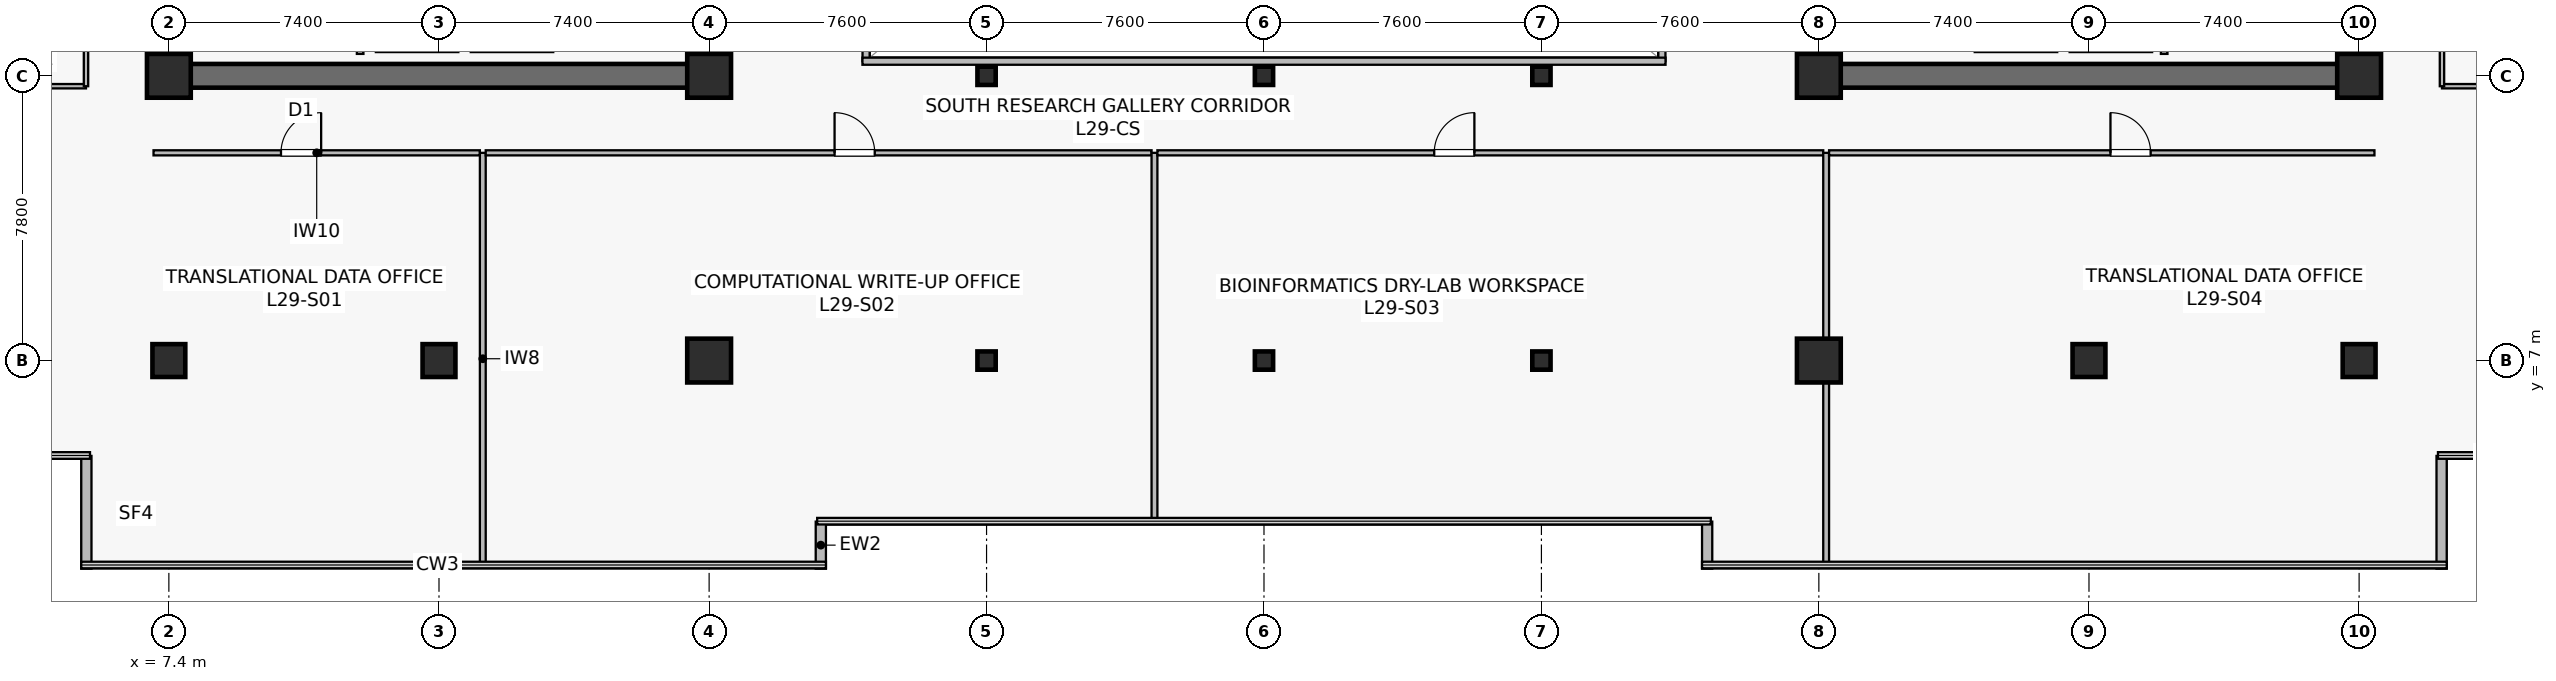
"""IFC4 building model, lengths in metres.
Left out: names, types, materials, properties, quantities, classifications, styles, units other than length and angle.
Written with IfcOpenShell. Run it as: python <this file> out.ifc"""

import sys

from ifc_helpers import new_model, si_unit, direction, frame, frame_2d, origin, origin_2d, place, context, subcontext, project, spatial, rectangle, hollow_rectangle, extrude, source, transform, mapped, element, fill, save


model = new_model("IFC4")
c1 = context("Model", 3, precision=1e-05, world=origin(), true_north=direction((0.0, 1.0)))
c2 = subcontext(c1, "Body", "Model", "MODEL_VIEW")
j1 = project(units=[si_unit("LENGTHUNIT", "METRE"), si_unit("PLANEANGLEUNIT", "RADIAN")], contexts=[c1])
p1 = place(None, origin())
s1 = spatial("IfcSite", under=j1, at=p1, CompositionType="ELEMENT")
p2 = place(p1, origin())
s2 = spatial("IfcBuilding", under=s1, at=p2, CompositionType="ELEMENT")
p3 = place(p2, frame((0.0, 0.0, 121.5)))
s3 = spatial("IfcBuildingStorey", under=s2, at=p3, CompositionType="ELEMENT", Elevation=121.5)
p4 = place(p3, frame((7.075, 14.8, 0.0), z_axis=(0.0, 0.0, 1.0), x_axis=(1.0, 0.0, 0.0)))
e1 = element("IfcWall", 1, at=p4, inside=s3, PredefinedType="SHEAR", context=c2, shape_type="SweptSolid", body=[
    extrude(rectangle(XDim=15.45, YDim=0.65, at=frame_2d((7.725, 0.0))), origin(), (0.0, 0.0, 1.0), 3.79),
])
p5 = place(p3, frame((7.4, 15.125, 0.0), z_axis=(0.0, 0.0, 1.0), x_axis=(0.0, 1.0, 0.0)))
e2 = element("IfcWall", 2, at=p5, inside=s3, PredefinedType="SHEAR", context=c2, shape_type="SweptSolid", body=[
    extrude(rectangle(XDim=18.35, YDim=0.65, at=frame_2d((9.175, 0.0))), origin(), (0.0, 0.0, 1.0), 3.79),
])
p6 = place(p3, frame((22.2, 15.125, 0.0), z_axis=(0.0, 0.0, 1.0), x_axis=(0.0, 1.0, 0.0)))
e3 = element("IfcWall", 3, at=p6, inside=s3, PredefinedType="SHEAR", context=c2, shape_type="SweptSolid", body=[
    extrude(rectangle(XDim=18.35, YDim=0.65, at=frame_2d((9.175, 0.0))), origin(), (0.0, 0.0, 1.0), 3.79),
])
p7 = place(p6, frame((3.425, 0.0, 0.0)))
e4 = element("IfcOpeningElement", 4, at=p7, cuts=e3, PredefinedType="OPENING", context=c2, shape_type="SweptSolid", body=[
    extrude(rectangle(XDim=1.42, YDim=2.2, at=frame_2d((0.71, 1.1))), frame((0.0, 0.335, 0.0), z_axis=(0.0, -1.0, 0.0), x_axis=(1.0, 0.0, 0.0)), (0.0, 0.0, 1.0), 0.67),
])
p8 = place(p3, frame((52.275, 14.8, 0.0), z_axis=(0.0, 0.0, 1.0), x_axis=(1.0, 0.0, 0.0)))
e5 = element("IfcWall", 5, at=p8, inside=s3, PredefinedType="SHEAR", context=c2, shape_type="SweptSolid", body=[
    extrude(rectangle(XDim=15.45, YDim=0.65, at=frame_2d((7.725, 0.0))), origin(), (0.0, 0.0, 1.0), 3.79),
])
p9 = place(p3, frame((52.6, 15.125, 0.0), z_axis=(0.0, 0.0, 1.0), x_axis=(0.0, 1.0, 0.0)))
e6 = element("IfcWall", 6, at=p9, inside=s3, PredefinedType="SHEAR", context=c2, shape_type="SweptSolid", body=[
    extrude(rectangle(XDim=18.35, YDim=0.65, at=frame_2d((9.175, 0.0))), origin(), (0.0, 0.0, 1.0), 3.79),
])
p10 = place(p9, frame((3.425, 0.0, 0.0)))
e7 = element("IfcOpeningElement", 7, at=p10, cuts=e6, PredefinedType="OPENING", context=c2, shape_type="SweptSolid", body=[
    extrude(rectangle(XDim=1.42, YDim=2.2, at=frame_2d((0.71, 1.1))), frame((0.0, 0.335, 0.0), z_axis=(0.0, -1.0, 0.0), x_axis=(1.0, 0.0, 0.0)), (0.0, 0.0, 1.0), 0.67),
])
p11 = place(p3, frame((67.4, 15.125, 0.0), z_axis=(0.0, 0.0, 1.0), x_axis=(0.0, 1.0, 0.0)))
e8 = element("IfcWall", 8, at=p11, inside=s3, PredefinedType="SHEAR", context=c2, shape_type="SweptSolid", body=[
    extrude(rectangle(XDim=18.35, YDim=0.65, at=frame_2d((9.175, 0.0))), origin(), (0.0, 0.0, 1.0), 3.79),
])
m1 = source(origin(), c2, "Body", "SweptSolid", [
    extrude(rectangle(XDim=0.9, YDim=0.9, at=origin_2d()), origin(), (0.0, 0.0, 1.0), 4.1),
])
p12 = place(p3, frame((14.8, 7.0, 0.0), z_axis=(0.0, 0.0, 1.0), x_axis=(1.0, 0.0, 0.0)))
e9 = element("IfcColumn", 9, at=p12, inside=s3, PredefinedType="COLUMN", context=c2, shape_type="MappedRepresentation", body=[
    mapped(m1, transform((0.0, 0.0, 0.0), scale=1.0)),
])
m2 = source(origin(), c2, "Body", "SweptSolid", [
    extrude(rectangle(XDim=1.2, YDim=1.2, at=origin_2d()), origin(), (0.0, 0.0, 1.0), 4.1),
])
for number, where, z_axis, x_axis in (
    (10, (22.2, 7.0, 0.0), (0.0, 0.0, 1.0), (1.0, 0.0, 0.0)),
    (11, (7.4, 14.8, 0.0), (0.0, 0.0, 1.0), (1.0, 0.0, 0.0)),
    (12, (22.2, 14.8, 0.0), (0.0, 0.0, 1.0), (1.0, 0.0, 0.0)),
    (13, (52.6, 7.0, 0.0), (0.0, 0.0, 1.0), (1.0, 0.0, 0.0)),
):
    element("IfcColumn", number, at=place(p3, frame(where, z_axis=z_axis, x_axis=x_axis)), inside=s3, PredefinedType="COLUMN", context=c2, shape_type="MappedRepresentation", body=[
        mapped(m2, transform((0.0, 0.0, 0.0), scale=1.0)),
    ])
p13 = place(p3, frame((60.0, 7.0, 0.0), z_axis=(0.0, 0.0, 1.0), x_axis=(1.0, 0.0, 0.0)))
e14 = element("IfcColumn", 14, at=p13, inside=s3, PredefinedType="COLUMN", context=c2, shape_type="MappedRepresentation", body=[
    mapped(m1, transform((0.0, 0.0, 0.0), scale=1.0)),
])
for number, where, z_axis, x_axis in (
    (15, (52.6, 14.8, 0.0), (0.0, 0.0, 1.0), (1.0, 0.0, 0.0)),
    (16, (67.4, 14.8, 0.0), (0.0, 0.0, 1.0), (1.0, 0.0, 0.0)),
):
    element("IfcColumn", number, at=place(p3, frame(where, z_axis=z_axis, x_axis=x_axis)), inside=s3, PredefinedType="COLUMN", context=c2, shape_type="MappedRepresentation", body=[
        mapped(m2, transform((0.0, 0.0, 0.0), scale=1.0)),
    ])
for number, where, z_axis, x_axis in (
    (17, (7.4, 7.0, 0.0), (0.0, 0.0, 1.0), (1.0, 0.0, 0.0)),
    (18, (67.4, 7.0, 0.0), (0.0, 0.0, 1.0), (1.0, 0.0, 0.0)),
):
    element("IfcColumn", number, at=place(p3, frame(where, z_axis=z_axis, x_axis=x_axis)), inside=s3, PredefinedType="COLUMN", context=c2, shape_type="MappedRepresentation", body=[
        mapped(m1, transform((0.0, 0.0, 0.0), scale=1.0)),
    ])
m3 = source(origin(), c2, "Body", "SweptSolid", [
    extrude(hollow_rectangle(XDim=0.5, YDim=0.5, WallThickness=0.022, at=origin_2d()), origin(), (0.0, 0.0, 1.0), 4.1),
])
for number, where, z_axis, x_axis in (
    (19, (29.8, 7.0, 0.0), (0.0, 0.0, 1.0), (1.0, 0.0, 0.0)),
    (20, (29.8, 14.8, 0.0), (0.0, 0.0, 1.0), (1.0, 0.0, 0.0)),
    (21, (37.4, 7.0, 0.0), (0.0, 0.0, 1.0), (1.0, 0.0, 0.0)),
    (22, (37.4, 14.8, 0.0), (0.0, 0.0, 1.0), (1.0, 0.0, 0.0)),
    (23, (45.0, 7.0, 0.0), (0.0, 0.0, 1.0), (1.0, 0.0, 0.0)),
    (24, (45.0, 14.8, 0.0), (0.0, 0.0, 1.0), (1.0, 0.0, 0.0)),
):
    element("IfcColumn", number, at=place(p3, frame(where, z_axis=z_axis, x_axis=x_axis)), inside=s3, PredefinedType="COLUMN", context=c2, shape_type="MappedRepresentation", body=[
        mapped(m3, transform((0.0, 0.0, 0.0), scale=1.0)),
    ])
for number, where, z_axis, x_axis in (
    (25, (25.26, 1.3, 0.0), (0.0, 0.0, 1.0), (0.0, 1.0, 0.0)),
    (26, (49.54, 2.588, 0.0), (0.0, 0.0, 1.0), (0.0, -1.0, 0.0)),
):
    element("IfcWall", number, at=place(p3, frame(where, z_axis=z_axis, x_axis=x_axis)), inside=s3, PredefinedType="STANDARD", context=c2, shape_type="SweptSolid", body=[
        extrude(rectangle(XDim=1.288, YDim=0.28, at=frame_2d((0.644, 0.0))), origin(), (0.0, 0.0, 1.0), 3.79),
    ])
for number, where, z_axis, x_axis in (
    (27, (69.66, 1.3, 0.0), (0.0, 0.0, 1.0), (0.0, 1.0, 0.0)),
    (28, (5.14, 4.388, 0.0), (0.0, 0.0, 1.0), (0.0, -1.0, 0.0)),
):
    element("IfcWall", number, at=place(p3, frame(where, z_axis=z_axis, x_axis=x_axis)), inside=s3, PredefinedType="STANDARD", context=c2, shape_type="SweptSolid", body=[
        extrude(rectangle(XDim=3.088, YDim=0.28, at=frame_2d((1.544, 0.0))), origin(), (0.0, 0.0, 1.0), 3.79),
    ])
p14 = place(p3, frame((13.07, 15.55, 0.0), z_axis=(0.0, 0.0, 1.0), x_axis=(1.0, 0.0, 0.0)))
e29 = element("IfcWall", 29, at=p14, inside=s3, PredefinedType="SOLIDWALL", context=c2, shape_type="SweptSolid", body=[
    extrude(rectangle(XDim=2.26, YDim=0.2, at=frame_2d((1.13, 0.0))), origin(), (0.0, 0.0, 1.0), 3.125),
])
p15 = place(p3, frame((15.67, 15.55, 0.0), z_axis=(0.0, 0.0, 1.0), x_axis=(1.0, 0.0, 0.0)))
e30 = element("IfcWall", 30, at=p15, inside=s3, PredefinedType="SOLIDWALL", context=c2, shape_type="SweptSolid", body=[
    extrude(rectangle(XDim=2.26, YDim=0.2, at=frame_2d((1.13, 0.0))), origin(), (0.0, 0.0, 1.0), 3.79),
])
p16 = place(p3, frame((12.64, 15.4, 0.0), z_axis=(0.0, 0.0, 1.0), x_axis=(0.0, 1.0, 0.0)))
e31 = element("IfcWall", 31, at=p16, inside=s3, PredefinedType="SOLIDWALL", context=c2, shape_type="SweptSolid", body=[
    extrude(rectangle(XDim=2.4, YDim=0.18, at=frame_2d((1.2, 0.0))), origin(), (0.0, 0.0, 1.0), 3.79),
])
p17 = place(p3, frame((59.47, 15.55, 0.0), z_axis=(0.0, 0.0, 1.0), x_axis=(1.0, 0.0, 0.0)))
e32 = element("IfcWall", 32, at=p17, inside=s3, PredefinedType="SOLIDWALL", context=c2, shape_type="SweptSolid", body=[
    extrude(rectangle(XDim=2.26, YDim=0.2, at=frame_2d((1.13, 0.0))), origin(), (0.0, 0.0, 1.0), 3.125),
])
p18 = place(p3, frame((56.87, 15.55, 0.0), z_axis=(0.0, 0.0, 1.0), x_axis=(1.0, 0.0, 0.0)))
e33 = element("IfcWall", 33, at=p18, inside=s3, PredefinedType="SOLIDWALL", context=c2, shape_type="SweptSolid", body=[
    extrude(rectangle(XDim=2.26, YDim=0.2, at=frame_2d((1.13, 0.0))), origin(), (0.0, 0.0, 1.0), 3.79),
])
p19 = place(p3, frame((62.06, 15.4, 0.0), z_axis=(0.0, 0.0, 1.0), x_axis=(0.0, 1.0, 0.0)))
e34 = element("IfcWall", 34, at=p19, inside=s3, PredefinedType="SOLIDWALL", context=c2, shape_type="SweptSolid", body=[
    extrude(rectangle(XDim=2.4, YDim=0.18, at=frame_2d((1.2, 0.0))), origin(), (0.0, 0.0, 1.0), 3.79),
])
p20 = place(p3, frame((26.5, 15.2, 0.0), z_axis=(0.0, 0.0, 1.0), x_axis=(0.0, 1.0, 0.0)))
e35 = element("IfcWall", 35, at=p20, inside=s3, PredefinedType="SOLIDWALL", context=c2, shape_type="SweptSolid", body=[
    extrude(rectangle(XDim=18.2, YDim=0.195, at=frame_2d((9.1, 0.0))), origin(), (0.0, 0.0, 1.0), 3.79),
])
p21 = place(p20, frame((1.8, 0.0, 0.9)))
e36 = element("IfcOpeningElement", 36, at=p21, cuts=e35, PredefinedType="OPENING", context=c2, shape_type="SweptSolid", body=[
    extrude(rectangle(XDim=1.2, YDim=1.35, at=frame_2d((0.6, 0.675))), frame((0.0, 0.107, 0.0), z_axis=(0.0, -1.0, 0.0), x_axis=(1.0, 0.0, 0.0)), (0.0, 0.0, 1.0), 0.215),
])
p22 = place(p20, frame((13.2, 0.0, 0.9)))
e37 = element("IfcOpeningElement", 37, at=p22, cuts=e35, PredefinedType="OPENING", context=c2, shape_type="SweptSolid", body=[
    extrude(rectangle(XDim=1.2, YDim=1.35, at=frame_2d((0.6, 0.675))), frame((0.0, 0.107, 0.0), z_axis=(0.0, -1.0, 0.0), x_axis=(1.0, 0.0, 0.0)), (0.0, 0.0, 1.0), 0.215),
])
p23 = place(p3, frame((48.3, 15.2, 0.0), z_axis=(0.0, 0.0, 1.0), x_axis=(0.0, 1.0, 0.0)))
e38 = element("IfcWall", 38, at=p23, inside=s3, PredefinedType="SOLIDWALL", context=c2, shape_type="SweptSolid", body=[
    extrude(rectangle(XDim=18.2, YDim=0.195, at=frame_2d((9.1, 0.0))), origin(), (0.0, 0.0, 1.0), 3.79),
])
p24 = place(p23, frame((1.8, 0.0, 0.9)))
e39 = element("IfcOpeningElement", 39, at=p24, cuts=e38, PredefinedType="OPENING", context=c2, shape_type="SweptSolid", body=[
    extrude(rectangle(XDim=1.2, YDim=1.35, at=frame_2d((0.6, 0.675))), frame((0.0, 0.107, 0.0), z_axis=(0.0, -1.0, 0.0), x_axis=(1.0, 0.0, 0.0)), (0.0, 0.0, 1.0), 0.215),
])
p25 = place(p23, frame((13.2, 0.0, 0.9)))
e40 = element("IfcOpeningElement", 40, at=p25, cuts=e38, PredefinedType="OPENING", context=c2, shape_type="SweptSolid", body=[
    extrude(rectangle(XDim=1.2, YDim=1.35, at=frame_2d((0.6, 0.675))), frame((0.0, 0.107, 0.0), z_axis=(0.0, -1.0, 0.0), x_axis=(1.0, 0.0, 0.0)), (0.0, 0.0, 1.0), 0.215),
])
p26 = place(p3, frame((26.4, 15.2, 0.0), z_axis=(0.0, 0.0, 1.0), x_axis=(1.0, 0.0, 0.0)))
e41 = element("IfcWall", 41, at=p26, inside=s3, PredefinedType="SOLIDWALL", context=c2, shape_type="SweptSolid", body=[
    extrude(rectangle(XDim=22.0, YDim=0.195, at=frame_2d((11.0, 0.0))), origin(), (0.0, 0.0, 1.0), 3.79),
])
p27 = place(p3, frame((6.98, 12.69, 0.0), z_axis=(0.0, 0.0, 1.0), x_axis=(1.0, 0.0, 0.0)))
e42 = element("IfcWall", 42, at=p27, inside=s3, PredefinedType="PARTITIONING", context=c2, shape_type="SweptSolid", body=[
    extrude(rectangle(XDim=8.94, YDim=0.14, at=frame_2d((4.47, 0.0))), origin(), (0.0, 0.0, 1.0), 3.125),
])
p28 = place(p27, frame((3.492, 0.0, 0.0)))
e43 = element("IfcOpeningElement", 43, at=p28, cuts=e42, PredefinedType="OPENING", context=c2, shape_type="SweptSolid", body=[
    extrude(rectangle(XDim=1.1, YDim=2.18, at=frame_2d((0.55, 1.09))), frame((0.0, 0.08, 0.0), z_axis=(0.0, -1.0, 0.0), x_axis=(1.0, 0.0, 0.0)), (0.0, 0.0, 1.0), 0.16),
])
p29 = place(p3, frame((16.0, 1.41, 0.0), z_axis=(0.0, 0.0, 1.0), x_axis=(0.0, 1.0, 0.0)))
e44 = element("IfcWall", 44, at=p29, inside=s3, PredefinedType="PARTITIONING", context=c2, shape_type="SweptSolid", body=[
    extrude(rectangle(XDim=11.28, YDim=0.16, at=frame_2d((5.64, 0.0))), origin(), (0.0, 0.0, 1.0), 3.075),
])
p30 = place(p3, frame((16.08, 12.69, 0.0), z_axis=(0.0, 0.0, 1.0), x_axis=(1.0, 0.0, 0.0)))
e45 = element("IfcWall", 45, at=p30, inside=s3, PredefinedType="PARTITIONING", context=c2, shape_type="SweptSolid", body=[
    extrude(rectangle(XDim=18.24, YDim=0.14, at=frame_2d((9.12, 0.0))), origin(), (0.0, 0.0, 1.0), 3.125),
])
p31 = place(p30, frame((9.556, 0.0, 0.0)))
e46 = element("IfcOpeningElement", 46, at=p31, cuts=e45, PredefinedType="OPENING", context=c2, shape_type="SweptSolid", body=[
    extrude(rectangle(XDim=1.1, YDim=2.18, at=frame_2d((0.55, 1.09))), frame((0.0, 0.08, 0.0), z_axis=(0.0, -1.0, 0.0), x_axis=(1.0, 0.0, 0.0)), (0.0, 0.0, 1.0), 0.16),
])
p32 = place(p3, frame((34.4, 2.61, 0.0), z_axis=(0.0, 0.0, 1.0), x_axis=(0.0, 1.0, 0.0)))
e47 = element("IfcWall", 47, at=p32, inside=s3, PredefinedType="PARTITIONING", context=c2, shape_type="SweptSolid", body=[
    extrude(rectangle(XDim=10.08, YDim=0.16, at=frame_2d((5.04, 0.0))), origin(), (0.0, 0.0, 1.0), 3.075),
])
p33 = place(p3, frame((34.48, 12.69, 0.0), z_axis=(0.0, 0.0, 1.0), x_axis=(1.0, 0.0, 0.0)))
e48 = element("IfcWall", 48, at=p33, inside=s3, PredefinedType="PARTITIONING", context=c2, shape_type="SweptSolid", body=[
    extrude(rectangle(XDim=18.24, YDim=0.14, at=frame_2d((9.12, 0.0))), origin(), (0.0, 0.0, 1.0), 3.125),
])
p34 = place(p33, frame((7.583, 0.0, 0.0)))
e49 = element("IfcOpeningElement", 49, at=p34, cuts=e48, PredefinedType="OPENING", context=c2, shape_type="SweptSolid", body=[
    extrude(rectangle(XDim=1.1, YDim=2.18, at=frame_2d((0.55, 1.09))), frame((0.0, 0.08, 0.0), z_axis=(0.0, -1.0, 0.0), x_axis=(1.0, 0.0, 0.0)), (0.0, 0.0, 1.0), 0.16),
])
p35 = place(p3, frame((52.8, 1.41, 0.0), z_axis=(0.0, 0.0, 1.0), x_axis=(0.0, 1.0, 0.0)))
e50 = element("IfcWall", 50, at=p35, inside=s3, PredefinedType="PARTITIONING", context=c2, shape_type="SweptSolid", body=[
    extrude(rectangle(XDim=11.28, YDim=0.16, at=frame_2d((5.64, 0.0))), origin(), (0.0, 0.0, 1.0), 3.075),
])
p36 = place(p3, frame((52.88, 12.69, 0.0), z_axis=(0.0, 0.0, 1.0), x_axis=(1.0, 0.0, 0.0)))
e51 = element("IfcWall", 51, at=p36, inside=s3, PredefinedType="PARTITIONING", context=c2, shape_type="SweptSolid", body=[
    extrude(rectangle(XDim=14.94, YDim=0.14, at=frame_2d((7.47, 0.0))), origin(), (0.0, 0.0, 1.0), 3.125),
])
p37 = place(p36, frame((7.708, 0.0, 0.0)))
e52 = element("IfcOpeningElement", 52, at=p37, cuts=e51, PredefinedType="OPENING", context=c2, shape_type="SweptSolid", body=[
    extrude(rectangle(XDim=1.1, YDim=2.18, at=frame_2d((0.55, 1.09))), frame((0.0, 0.08, 0.0), z_axis=(0.0, -1.0, 0.0), x_axis=(1.0, 0.0, 0.0)), (0.0, 0.0, 1.0), 0.16),
])
p38 = place(p3, frame((2.11, 14.515, 0.0), z_axis=(0.0, 0.0, 1.0), x_axis=(1.0, 0.0, 0.0)))
e53 = element("IfcWall", 53, at=p38, inside=s3, PredefinedType="PARTITIONING", context=c2, shape_type="SweptSolid", body=[
    extrude(rectangle(XDim=3.02, YDim=0.12, at=frame_2d((1.51, 0.0))), origin(), (0.0, 0.0, 1.0), 3.79),
])
p39 = place(p3, frame((5.13, 14.515, 0.0), z_axis=(0.0, 0.0, 1.0), x_axis=(0.0, 1.0, 0.0)))
e54 = element("IfcWall", 54, at=p39, inside=s3, PredefinedType="PARTITIONING", context=c2, shape_type="SweptSolid", body=[
    extrude(rectangle(XDim=19.57, YDim=0.12, at=frame_2d((9.785, 0.0))), origin(), (0.0, 0.0, 1.0), 3.79),
])
p40 = place(p39, frame((9.335, 0.0, 0.0)))
e55 = element("IfcOpeningElement", 55, at=p40, cuts=e54, PredefinedType="OPENING", context=c2, shape_type="SweptSolid", body=[
    extrude(rectangle(XDim=0.9, YDim=2.1, at=frame_2d((0.45, 1.05))), frame((0.0, 0.07, 0.0), z_axis=(0.0, -1.0, 0.0), x_axis=(1.0, 0.0, 0.0)), (0.0, 0.0, 1.0), 0.14),
])
p41 = place(p3, frame((69.67, 14.515, 0.0), z_axis=(0.0, 0.0, 1.0), x_axis=(1.0, 0.0, 0.0)))
e56 = element("IfcWall", 56, at=p41, inside=s3, PredefinedType="PARTITIONING", context=c2, shape_type="SweptSolid", body=[
    extrude(rectangle(XDim=3.02, YDim=0.12, at=frame_2d((1.51, 0.0))), origin(), (0.0, 0.0, 1.0), 3.79),
])
p42 = place(p3, frame((69.67, 14.515, 0.0), z_axis=(0.0, 0.0, 1.0), x_axis=(0.0, 1.0, 0.0)))
e57 = element("IfcWall", 57, at=p42, inside=s3, PredefinedType="PARTITIONING", context=c2, shape_type="SweptSolid", body=[
    extrude(rectangle(XDim=6.025, YDim=0.12, at=frame_2d((3.013, 0.0))), origin(), (0.0, 0.0, 1.0), 3.79),
])
p43 = place(p42, frame((2.562, 0.0, 0.0)))
e58 = element("IfcOpeningElement", 58, at=p43, cuts=e57, PredefinedType="OPENING", context=c2, shape_type="SweptSolid", body=[
    extrude(rectangle(XDim=0.9, YDim=2.1, at=frame_2d((0.45, 1.05))), frame((0.0, 0.07, 0.0), z_axis=(0.0, -1.0, 0.0), x_axis=(1.0, 0.0, 0.0)), (0.0, 0.0, 1.0), 0.14),
])
m4 = source(origin(), c2, "Body", "SweptSolid", [
    extrude(rectangle(XDim=1.1, YDim=2.18, at=frame_2d((0.55, 1.09))), frame((0.0, 0.025, 0.0), z_axis=(0.0, -1.0, 0.0), x_axis=(1.0, 0.0, 0.0)), (0.0, 0.0, 1.0), 0.05),
])
p44 = place(p28, origin())
e59 = element("IfcDoor", 59, at=p44, inside=s3, OperationType="SINGLE_SWING_RIGHT", PredefinedType="DOOR", context=c2, shape_type="MappedRepresentation", body=[
    mapped(m4, transform((0.0, 0.0, 0.0), scale=1.0)),
])
fill(e43, e59)
p45 = place(p31, origin())
e60 = element("IfcDoor", 60, at=p45, inside=s3, OperationType="SINGLE_SWING_LEFT", PredefinedType="DOOR", context=c2, shape_type="MappedRepresentation", body=[
    mapped(m4, transform((0.0, 0.0, 0.0), scale=1.0)),
])
fill(e46, e60)
p46 = place(p34, origin())
e61 = element("IfcDoor", 61, at=p46, inside=s3, OperationType="SINGLE_SWING_RIGHT", PredefinedType="DOOR", context=c2, shape_type="MappedRepresentation", body=[
    mapped(m4, transform((0.0, 0.0, 0.0), scale=1.0)),
])
fill(e49, e61)
p47 = place(p37, origin())
e62 = element("IfcDoor", 62, at=p47, inside=s3, OperationType="SINGLE_SWING_LEFT", PredefinedType="DOOR", context=c2, shape_type="MappedRepresentation", body=[
    mapped(m4, transform((0.0, 0.0, 0.0), scale=1.0)),
])
fill(e52, e62)
save(model, sys.argv[1])
